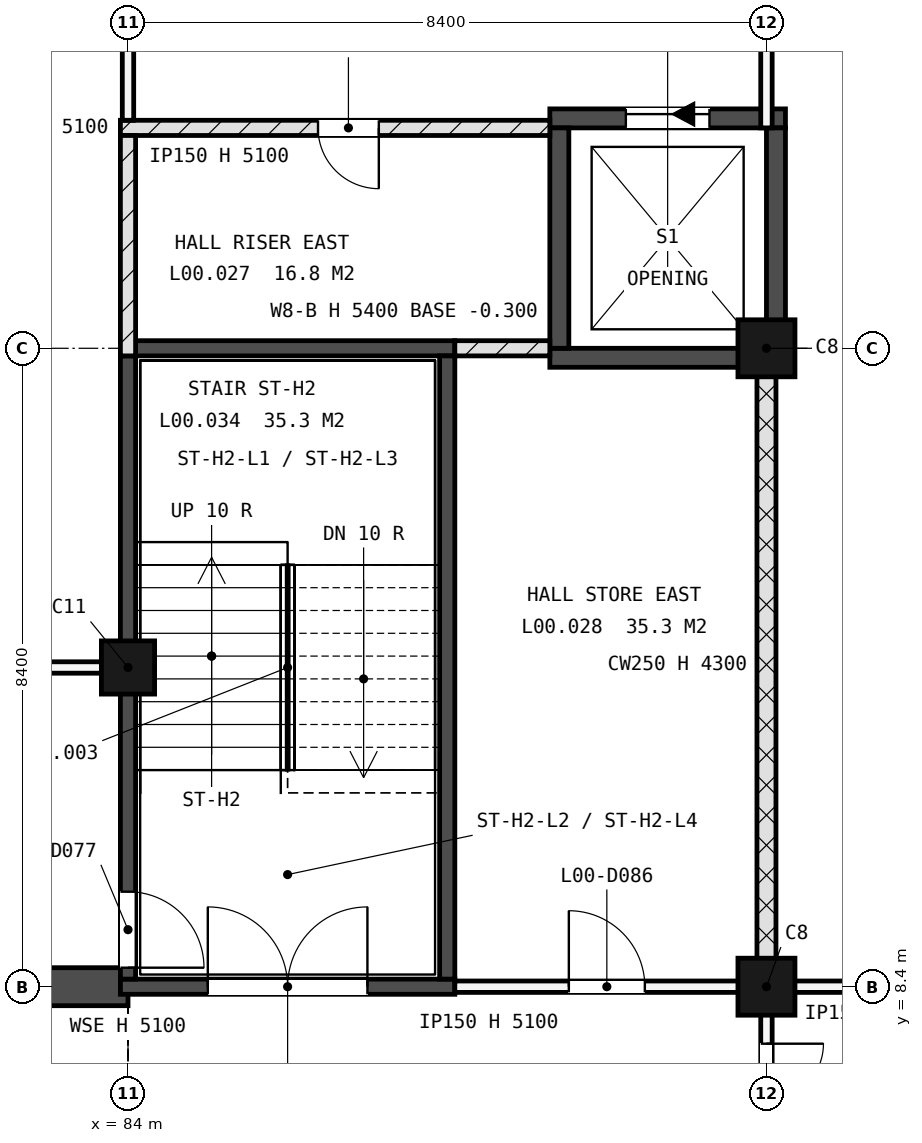
"""IFC4 building model, lengths in metres.
Left out: names, types, materials, properties, quantities, classifications, styles, units other than length and angle.
Written with IfcOpenShell. Run it as: python <this file> out.ifc"""

import sys

from ifc_helpers import new_model, si_unit, direction, frame, frame_2d, origin, origin_2d, place, context, subcontext, project, spatial, rectangle, circle, extrude, element, fill, save


model = new_model("IFC4")
c1 = context("Model", 3, precision=1e-05, world=origin(), true_north=direction((0.0, 1.0)))
c2 = subcontext(c1, "Body", "Model", "MODEL_VIEW")
j1 = project(units=[si_unit("LENGTHUNIT", "METRE"), si_unit("PLANEANGLEUNIT", "RADIAN")], contexts=[c1])
p1 = place(None, origin())
s1 = spatial("IfcSite", under=j1, at=p1, CompositionType="ELEMENT")
p2 = place(p1, origin())
s2 = spatial("IfcBuilding", under=s1, at=p2, CompositionType="ELEMENT")
p3 = place(p2, origin())
s3 = spatial("IfcBuildingStorey", under=s2, at=p3, CompositionType="ELEMENT", Elevation=0.0)
for number, where, z_axis, x_axis in (
    (1, (92.4, 8.4, -0.3), (0.0, 0.0, 1.0), (1.0, 0.0, 0.0)),
    (2, (92.4, 16.8, -0.3), (0.0, 0.0, 1.0), (1.0, 0.0, 0.0)),
):
    element("IfcColumn", number, at=place(p3, frame(where, z_axis=z_axis, x_axis=x_axis)), inside=s3, PredefinedType="COLUMN", context=c2, shape_type="SweptSolid", body=[
        extrude(rectangle(XDim=0.75, YDim=0.75, at=origin_2d()), origin(), (0.0, 0.0, 1.0), 5.4),
    ])
p4 = place(p3, frame((84.0, 12.6, -0.3), z_axis=(0.0, 0.0, 1.0), x_axis=(1.0, 0.0, 0.0)))
e3 = element("IfcColumn", 3, at=p4, inside=s3, PredefinedType="COLUMN", context=c2, shape_type="SweptSolid", body=[
    extrude(circle(Radius=0.35, at=origin_2d()), origin(), (0.0, 0.0, 1.0), 5.4),
])
p5 = place(p3, frame((89.55, 16.675, -0.3), z_axis=(0.0, 0.0, 1.0), x_axis=(1.0, 0.0, 0.0)))
e4 = element("IfcWall", 4, at=p5, inside=s3, PredefinedType="SHEAR", context=c2, shape_type="SweptSolid", body=[
    extrude(rectangle(XDim=3.1, YDim=0.25, at=frame_2d((1.55, 0.0))), origin(), (0.0, 0.0, 1.0), 5.4),
])
p6 = place(p3, frame((89.55, 19.825, -0.3), z_axis=(0.0, 0.0, 1.0), x_axis=(1.0, 0.0, 0.0)))
e5 = element("IfcWall", 5, at=p6, inside=s3, PredefinedType="SHEAR", context=c2, shape_type="SweptSolid", body=[
    extrude(rectangle(XDim=3.1, YDim=0.25, at=frame_2d((1.55, 0.0))), origin(), (0.0, 0.0, 1.0), 5.4),
])
p7 = place(p6, frame((1.0, 0.0, 0.3)))
e6 = element("IfcOpeningElement", 6, at=p7, cuts=e5, PredefinedType="OPENING", context=c2, shape_type="SweptSolid", body=[
    extrude(rectangle(XDim=1.1, YDim=2.1, at=frame_2d((0.55, 1.05))), frame((0.0, 0.135, 0.0), z_axis=(0.0, -1.0, 0.0), x_axis=(1.0, 0.0, 0.0)), (0.0, 0.0, 1.0), 0.27),
])
for number, where, z_axis, x_axis in (
    (7, (89.675, 16.8, -0.3), (0.0, 0.0, 1.0), (0.0, 1.0, 0.0)),
    (8, (92.525, 16.8, -0.3), (0.0, 0.0, 1.0), (0.0, 1.0, 0.0)),
):
    element("IfcWall", number, at=place(p3, frame(where, z_axis=z_axis, x_axis=x_axis)), inside=s3, PredefinedType="SHEAR", context=c2, shape_type="SweptSolid", body=[
        extrude(rectangle(XDim=2.9, YDim=0.25, at=frame_2d((1.45, 0.0))), origin(), (0.0, 0.0, 1.0), 5.4),
    ])
p8 = place(p3, frame((42.0, 8.4, -0.3), z_axis=(0.0, 0.0, 1.0), x_axis=(1.0, 0.0, 0.0)))
e9 = element("IfcWall", 9, at=p8, inside=s3, PredefinedType="SHEAR", context=c2, shape_type="SweptSolid", body=[
    extrude(rectangle(XDim=42.0, YDim=0.5, at=frame_2d((21.0, 0.0))), origin(), (0.0, 0.0, 1.0), 5.4),
])
p9 = place(p8, frame((20.6, 0.0, 0.3)))
e10 = element("IfcOpeningElement", 10, at=p9, cuts=e9, PredefinedType="OPENING", context=c2, shape_type="SweptSolid", body=[
    extrude(rectangle(XDim=1.0, YDim=2.1, at=frame_2d((0.5, 1.05))), frame((0.0, 0.26, 0.0), z_axis=(0.0, -1.0, 0.0), x_axis=(1.0, 0.0, 0.0)), (0.0, 0.0, 1.0), 0.52),
])
p10 = place(p3, frame((83.9, 8.4, 0.0), z_axis=(0.0, 0.0, 1.0), x_axis=(1.0, 0.0, 0.0)))
e11 = element("IfcWall", 11, at=p10, inside=s3, PredefinedType="SHEAR", context=c2, shape_type="SweptSolid", body=[
    extrude(rectangle(XDim=4.4, YDim=0.2, at=frame_2d((2.2, 0.0))), origin(), (0.0, 0.0, 1.0), 5.1),
])
p11 = place(p10, frame((1.15, 0.0, 0.0)))
e12 = element("IfcOpeningElement", 12, at=p11, cuts=e11, PredefinedType="OPENING", context=c2, shape_type="SweptSolid", body=[
    extrude(rectangle(XDim=2.1, YDim=2.1, at=frame_2d((1.05, 1.05))), frame((0.0, 0.11, 0.0), z_axis=(0.0, -1.0, 0.0), x_axis=(1.0, 0.0, 0.0)), (0.0, 0.0, 1.0), 0.22),
])
p12 = place(p3, frame((83.9, 16.8, 0.0), z_axis=(0.0, 0.0, 1.0), x_axis=(1.0, 0.0, 0.0)))
e13 = element("IfcWall", 13, at=p12, inside=s3, PredefinedType="SHEAR", context=c2, shape_type="SweptSolid", body=[
    extrude(rectangle(XDim=4.4, YDim=0.2, at=frame_2d((2.2, 0.0))), origin(), (0.0, 0.0, 1.0), 5.1),
])
p13 = place(p3, frame((84.0, 8.5, 0.0), z_axis=(0.0, 0.0, 1.0), x_axis=(0.0, 1.0, 0.0)))
e14 = element("IfcWall", 14, at=p13, inside=s3, PredefinedType="SHEAR", context=c2, shape_type="SweptSolid", body=[
    extrude(rectangle(XDim=8.2, YDim=0.2, at=frame_2d((4.1, 0.0))), origin(), (0.0, 0.0, 1.0), 5.1),
])
p14 = place(p13, frame((0.15, 0.0, 0.0)))
e15 = element("IfcOpeningElement", 15, at=p14, cuts=e14, PredefinedType="OPENING", context=c2, shape_type="SweptSolid", body=[
    extrude(rectangle(XDim=1.0, YDim=2.1, at=frame_2d((0.5, 1.05))), frame((0.0, 0.11, 0.0), z_axis=(0.0, -1.0, 0.0), x_axis=(1.0, 0.0, 0.0)), (0.0, 0.0, 1.0), 0.22),
])
p15 = place(p3, frame((88.2, 8.5, 0.0), z_axis=(0.0, 0.0, 1.0), x_axis=(0.0, 1.0, 0.0)))
e16 = element("IfcWall", 16, at=p15, inside=s3, PredefinedType="SHEAR", context=c2, shape_type="SweptSolid", body=[
    extrude(rectangle(XDim=8.2, YDim=0.2, at=frame_2d((4.1, 0.0))), origin(), (0.0, 0.0, 1.0), 5.1),
])
p16 = place(p3, frame((88.3, 8.4, 0.0), z_axis=(0.0, 0.0, 1.0), x_axis=(1.0, 0.0, 0.0)))
e17 = element("IfcWall", 17, at=p16, inside=s3, PredefinedType="PARTITIONING", context=c2, shape_type="SweptSolid", body=[
    extrude(rectangle(XDim=4.455, YDim=0.15, at=frame_2d((2.228, 0.0))), origin(), (0.0, 0.0, 1.0), 5.1),
])
p17 = place(p16, frame((1.5, 0.0, 0.0)))
e18 = element("IfcOpeningElement", 18, at=p17, cuts=e17, PredefinedType="OPENING", context=c2, shape_type="SweptSolid", body=[
    extrude(rectangle(XDim=1.0, YDim=2.1, at=frame_2d((0.5, 1.05))), frame((0.0, 0.085, 0.0), z_axis=(0.0, -1.0, 0.0), x_axis=(1.0, 0.0, 0.0)), (0.0, 0.0, 1.0), 0.17),
])
p18 = place(p3, frame((92.755, 8.4, 0.0), z_axis=(0.0, 0.0, 1.0), x_axis=(1.0, 0.0, 0.0)))
e19 = element("IfcWall", 19, at=p18, inside=s3, PredefinedType="PARTITIONING", context=c2, shape_type="SweptSolid", body=[
    extrude(rectangle(XDim=24.845, YDim=0.15, at=frame_2d((12.423, 0.0))), origin(), (0.0, 0.0, 1.0), 4.3),
])
p19 = place(p18, frame((21.095, 0.0, 0.0)))
e20 = element("IfcOpeningElement", 20, at=p19, cuts=e19, PredefinedType="OPENING", context=c2, shape_type="SweptSolid", body=[
    extrude(rectangle(XDim=2.1, YDim=2.4, at=frame_2d((1.05, 1.2))), frame((0.0, 0.085, 0.0), z_axis=(0.0, -1.0, 0.0), x_axis=(1.0, 0.0, 0.0)), (0.0, 0.0, 1.0), 0.17),
])
p20 = place(p3, frame((41.875, 12.6, 0.0), z_axis=(0.0, 0.0, 1.0), x_axis=(1.0, 0.0, 0.0)))
e21 = element("IfcWall", 21, at=p20, inside=s3, PredefinedType="PARTITIONING", context=c2, shape_type="SweptSolid", body=[
    extrude(rectangle(XDim=42.025, YDim=0.15, at=frame_2d((21.012, 0.0))), origin(), (0.0, 0.0, 1.0), 4.2),
])
p21 = place(p20, frame((19.925, 0.0, 0.0)))
e22 = element("IfcOpeningElement", 22, at=p21, cuts=e21, PredefinedType="OPENING", context=c2, shape_type="SweptSolid", body=[
    extrude(rectangle(XDim=2.4, YDim=2.1, at=frame_2d((1.2, 1.05))), frame((0.0, 0.085, 0.0), z_axis=(0.0, -1.0, 0.0), x_axis=(1.0, 0.0, 0.0)), (0.0, 0.0, 1.0), 0.17),
])
p22 = place(p3, frame((88.3, 16.8, 0.0), z_axis=(0.0, 0.0, 1.0), x_axis=(1.0, 0.0, 0.0)))
e23 = element("IfcWall", 23, at=p22, inside=s3, PredefinedType="SOLIDWALL", context=c2, shape_type="SweptSolid", body=[
    extrude(rectangle(XDim=1.25, YDim=0.2, at=frame_2d((0.625, 0.0))), origin(), (0.0, 0.0, 1.0), 5.1),
])
p23 = place(p3, frame((83.9, 19.7, 0.0), z_axis=(0.0, 0.0, 1.0), x_axis=(1.0, 0.0, 0.0)))
e24 = element("IfcWall", 24, at=p23, inside=s3, PredefinedType="SOLIDWALL", context=c2, shape_type="SweptSolid", body=[
    extrude(rectangle(XDim=5.65, YDim=0.2, at=frame_2d((2.825, 0.0))), origin(), (0.0, 0.0, 1.0), 5.1),
])
p24 = place(p23, frame((2.6, 0.0, 0.0)))
e25 = element("IfcOpeningElement", 25, at=p24, cuts=e24, PredefinedType="OPENING", context=c2, shape_type="SweptSolid", body=[
    extrude(rectangle(XDim=0.8, YDim=2.1, at=frame_2d((0.4, 1.05))), frame((0.0, 0.11, 0.0), z_axis=(0.0, -1.0, 0.0), x_axis=(1.0, 0.0, 0.0)), (0.0, 0.0, 1.0), 0.22),
])
p25 = place(p3, frame((84.0, 16.7, 0.0), z_axis=(0.0, 0.0, 1.0), x_axis=(0.0, 1.0, 0.0)))
e26 = element("IfcWall", 26, at=p25, inside=s3, PredefinedType="SOLIDWALL", context=c2, shape_type="SweptSolid", body=[
    extrude(rectangle(XDim=2.9, YDim=0.2, at=frame_2d((1.45, 0.0))), origin(), (0.0, 0.0, 1.0), 5.1),
])
p26 = place(p3, frame((84.0, 19.8, 0.0), z_axis=(0.0, 0.0, 1.0), x_axis=(0.0, 1.0, 0.0)))
e27 = element("IfcWall", 27, at=p26, inside=s3, PredefinedType="PARTITIONING", context=c2, shape_type="SweptSolid", body=[
    extrude(rectangle(XDim=5.83, YDim=0.15, at=frame_2d((2.915, 0.0))), origin(), (0.0, 0.0, 1.0), 5.1),
])
p27 = place(p3, frame((92.4, 5.475, 0.0), z_axis=(0.0, 0.0, 1.0), x_axis=(0.0, 1.0, 0.0)))
e28 = element("IfcWall", 28, at=p27, inside=s3, PredefinedType="PARTITIONING", context=c2, shape_type="SweptSolid", body=[
    extrude(rectangle(XDim=2.85, YDim=0.15, at=frame_2d((1.425, 0.0))), origin(), (0.0, 0.0, 1.0), 4.3),
])
p28 = place(p27, frame((0.675, 0.0, 0.0)))
e29 = element("IfcOpeningElement", 29, at=p28, cuts=e28, PredefinedType="OPENING", context=c2, shape_type="SweptSolid", body=[
    extrude(rectangle(XDim=1.5, YDim=2.1, at=frame_2d((0.75, 1.05))), frame((0.0, 0.085, 0.0), z_axis=(0.0, -1.0, 0.0), x_axis=(1.0, 0.0, 0.0)), (0.0, 0.0, 1.0), 0.17),
])
p29 = place(p3, frame((92.4, 8.475, 0.0), z_axis=(0.0, 0.0, 1.0), x_axis=(0.0, 1.0, 0.0)))
e30 = element("IfcWall", 30, at=p29, inside=s3, PredefinedType="SOLIDWALL", context=c2, shape_type="SweptSolid", body=[
    extrude(rectangle(XDim=8.325, YDim=0.25, at=frame_2d((4.163, 0.0))), origin(), (0.0, 0.0, 1.0), 4.3),
])
p30 = place(p3, frame((92.4, 19.7, 0.0), z_axis=(0.0, 0.0, 1.0), x_axis=(0.0, 1.0, 0.0)))
e31 = element("IfcWall", 31, at=p30, inside=s3, PredefinedType="PARTITIONING", context=c2, shape_type="SweptSolid", body=[
    extrude(rectangle(XDim=13.545, YDim=0.15, at=frame_2d((6.772, 0.0))), origin(), (0.0, 0.0, 1.0), 4.3),
])
p31 = place(p7, origin())
e32 = element("IfcDoor", 32, at=p31, inside=s3, OperationType="SLIDING_TO_LEFT", PredefinedType="DOOR", context=c2, shape_type="SweptSolid", body=[
    extrude(rectangle(XDim=1.1, YDim=2.1, at=frame_2d((0.55, 1.05))), frame((0.0, 0.025, 0.0), z_axis=(0.0, -1.0, 0.0), x_axis=(1.0, 0.0, 0.0)), (0.0, 0.0, 1.0), 0.05),
])
fill(e6, e32)
p32 = place(p11, origin())
e33 = element("IfcDoor", 33, at=p32, inside=s3, OperationType="DOUBLE_DOOR_SINGLE_SWING", PredefinedType="DOOR", context=c2, shape_type="SweptSolid", body=[
    extrude(rectangle(XDim=2.1, YDim=2.1, at=frame_2d((1.05, 1.05))), frame((0.0, 0.025, 0.0), z_axis=(0.0, -1.0, 0.0), x_axis=(1.0, 0.0, 0.0)), (0.0, 0.0, 1.0), 0.05),
])
fill(e12, e33)
p33 = place(p14, origin())
e34 = element("IfcDoor", 34, at=p33, inside=s3, OperationType="SINGLE_SWING_LEFT", PredefinedType="DOOR", context=c2, shape_type="SweptSolid", body=[
    extrude(rectangle(XDim=1.0, YDim=2.1, at=frame_2d((0.5, 1.05))), frame((0.0, 0.025, 0.0), z_axis=(0.0, -1.0, 0.0), x_axis=(1.0, 0.0, 0.0)), (0.0, 0.0, 1.0), 0.05),
])
fill(e15, e34)
p34 = place(p28, origin())
e35 = element("IfcDoor", 35, at=p34, inside=s3, OperationType="DOUBLE_DOOR_SINGLE_SWING", PredefinedType="DOOR", context=c2, shape_type="SweptSolid", body=[
    extrude(rectangle(XDim=1.5, YDim=2.1, at=frame_2d((0.75, 1.05))), frame((0.0, 0.025, 0.0), z_axis=(0.0, -1.0, 0.0), x_axis=(1.0, 0.0, 0.0)), (0.0, 0.0, 1.0), 0.05),
])
fill(e29, e35)
p35 = place(p24, origin())
e36 = element("IfcDoor", 36, at=p35, inside=s3, OperationType="SINGLE_SWING_RIGHT", PredefinedType="DOOR", context=c2, shape_type="SweptSolid", body=[
    extrude(rectangle(XDim=0.8, YDim=2.1, at=frame_2d((0.4, 1.05))), frame((0.0, 0.025, 0.0), z_axis=(0.0, -1.0, 0.0), x_axis=(1.0, 0.0, 0.0)), (0.0, 0.0, 1.0), 0.05),
])
fill(e25, e36)
p36 = place(p17, origin())
e37 = element("IfcDoor", 37, at=p36, inside=s3, OperationType="SINGLE_SWING_RIGHT", PredefinedType="DOOR", context=c2, shape_type="SweptSolid", body=[
    extrude(rectangle(XDim=1.0, YDim=2.1, at=frame_2d((0.5, 1.05))), frame((0.0, 0.025, 0.0), z_axis=(0.0, -1.0, 0.0), x_axis=(1.0, 0.0, 0.0)), (0.0, 0.0, 1.0), 0.05),
])
fill(e18, e37)
save(model, sys.argv[1])
